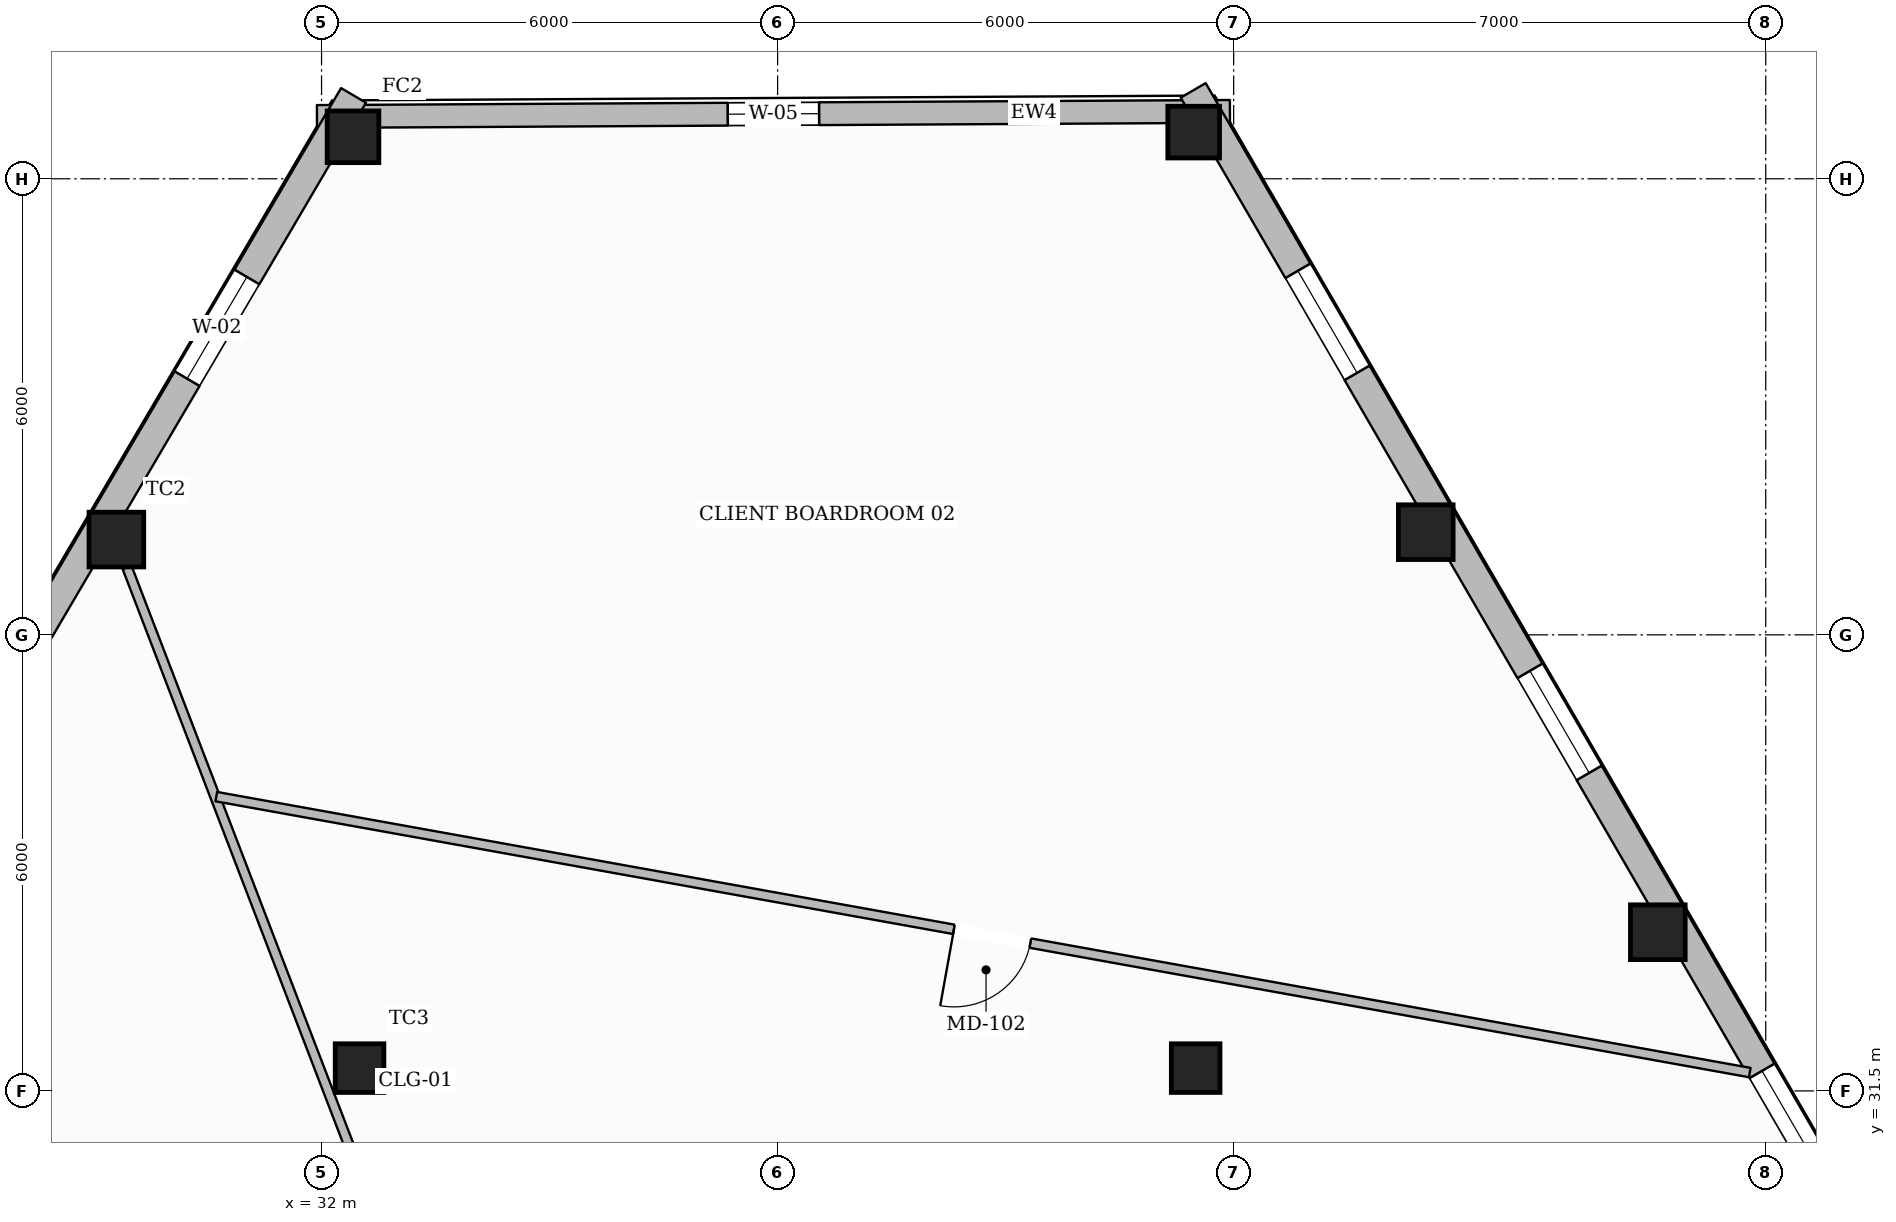
"""IFC4 building model, lengths in metres.
Left out: names, types, materials, properties, quantities, classifications, styles, units other than length and angle.
Written with IfcOpenShell. Run it as: python <this file> out.ifc"""

import sys

from ifc_helpers import new_model, si_unit, direction, frame, frame_2d, origin, origin_2d, place, context, subcontext, project, spatial, rectangle, hollow_rectangle, extrude, element, fill, save


model = new_model("IFC4")
c1 = context("Model", 3, precision=1e-05, world=origin(), true_north=direction((0.0, 1.0)))
c2 = subcontext(c1, "Body", "Model", "MODEL_VIEW")
j1 = project(units=[si_unit("LENGTHUNIT", "METRE"), si_unit("PLANEANGLEUNIT", "RADIAN")], contexts=[c1])
p1 = place(None, origin())
s1 = spatial("IfcSite", under=j1, at=p1, CompositionType="ELEMENT")
p2 = place(p1, origin())
s2 = spatial("IfcBuilding", under=s1, at=p2, CompositionType="ELEMENT")
p3 = place(p2, frame((0.0, 0.0, 139.4)))
s3 = spatial("IfcBuildingStorey", under=s2, at=p3, CompositionType="ELEMENT", Elevation=139.4)
p4 = place(p3, frame((32.414, 44.052, 0.0), z_axis=(0.0, 0.0, 1.0), x_axis=(1.0, 0.0, 0.0)))
e1 = element("IfcColumn", 1, at=p4, inside=s3, PredefinedType="COLUMN", context=c2, shape_type="SweptSolid", body=[
    extrude(hollow_rectangle(XDim=0.68, YDim=0.68, WallThickness=0.03, at=origin_2d()), origin(), (0.0, 0.0, 1.0), 3.6),
])
for number, where, z_axis, x_axis in (
    (2, (29.301, 38.753, 0.0), (0.0, 0.0, 1.0), (1.0, 0.0, 0.0)),
    (3, (49.58, 33.588, 0.0), (0.0, 0.0, 1.0), (1.0, 0.0, 0.0)),
    (4, (46.527, 38.851, 0.0), (0.0, 0.0, 1.0), (1.0, 0.0, 0.0)),
):
    element("IfcColumn", number, at=place(p3, frame(where, z_axis=z_axis, x_axis=x_axis)), inside=s3, PredefinedType="COLUMN", context=c2, shape_type="SweptSolid", body=[
        extrude(hollow_rectangle(XDim=0.72, YDim=0.72, WallThickness=0.032, at=origin_2d()), origin(), (0.0, 0.0, 1.0), 3.6),
    ])
p5 = place(p3, frame((43.474, 44.114, 0.0), z_axis=(0.0, 0.0, 1.0), x_axis=(1.0, 0.0, 0.0)))
e5 = element("IfcColumn", 5, at=p5, inside=s3, PredefinedType="COLUMN", context=c2, shape_type="SweptSolid", body=[
    extrude(hollow_rectangle(XDim=0.68, YDim=0.68, WallThickness=0.03, at=origin_2d()), origin(), (0.0, 0.0, 1.0), 3.6),
])
for number, where, z_axis, x_axis in (
    (6, (32.5, 31.8, 0.0), (0.0, 0.0, 1.0), (1.0, 0.0, 0.0)),
    (7, (43.5, 31.8, 0.0), (0.0, 0.0, 1.0), (1.0, 0.0, 0.0)),
):
    element("IfcColumn", number, at=place(p3, frame(where, z_axis=z_axis, x_axis=x_axis)), inside=s3, PredefinedType="COLUMN", context=c2, shape_type="SweptSolid", body=[
        extrude(hollow_rectangle(XDim=0.64, YDim=0.64, WallThickness=0.028, at=origin_2d()), origin(), (0.0, 0.0, 1.0), 3.6),
    ])
p6 = place(p3, frame((31.94, 44.32, 0.0), z_axis=(0.0, 0.0, 1.0), x_axis=(0.999984603996, 0.005549033414, 0.0)))
e8 = element("IfcWall", 8, at=p6, inside=s3, PredefinedType="STANDARD", context=c2, shape_type="SweptSolid", body=[
    extrude(rectangle(XDim=12.011, YDim=0.3, at=frame_2d((6.006, 0.0))), origin(), (0.0, 0.0, 1.0), 3.059),
])
p7 = place(p6, frame((5.406, 0.0, 0.65)))
e9 = element("IfcOpeningElement", 9, at=p7, cuts=e8, PredefinedType="OPENING", context=c2, shape_type="SweptSolid", body=[
    extrude(rectangle(XDim=1.2, YDim=1.7, at=frame_2d((0.6, 0.85))), frame((0.0, 0.16, 0.0), z_axis=(0.0, -1.0, 0.0), x_axis=(1.0, 0.0, 0.0)), (0.0, 0.0, 1.0), 0.32),
])
p8 = place(p3, frame((13.257, 11.982, 0.0), z_axis=(0.0, 0.0, 1.0), x_axis=(0.506593608381, 0.862184966204, 0.0)))
e10 = element("IfcWall", 10, at=p8, inside=s3, PredefinedType="STANDARD", context=c2, shape_type="SweptSolid", body=[
    extrude(rectangle(XDim=37.828, YDim=0.38, at=frame_2d((18.914, 0.0))), origin(), (0.0, 0.0, 1.0), 3.059),
])
p9 = place(p8, frame((33.507, 0.0, 0.65)))
e11 = element("IfcOpeningElement", 11, at=p9, cuts=e10, PredefinedType="OPENING", context=c2, shape_type="SweptSolid", body=[
    extrude(rectangle(XDim=1.55, YDim=1.75, at=frame_2d((0.775, 0.875))), frame((0.0, 0.2, 0.0), z_axis=(0.0, -1.0, 0.0), x_axis=(1.0, 0.0, 0.0)), (0.0, 0.0, 1.0), 0.4),
])
p10 = place(p8, frame((27.362, 0.0, 0.65)))
e12 = element("IfcOpeningElement", 12, at=p10, cuts=e10, PredefinedType="OPENING", context=c2, shape_type="SweptSolid", body=[
    extrude(rectangle(XDim=1.55, YDim=1.75, at=frame_2d((0.775, 0.875))), frame((0.0, 0.2, 0.0), z_axis=(0.0, -1.0, 0.0), x_axis=(1.0, 0.0, 0.0)), (0.0, 0.0, 1.0), 0.4),
])
p11 = place(p8, frame((15.07, 0.0, 0.65)))
e13 = element("IfcOpeningElement", 13, at=p11, cuts=e10, PredefinedType="OPENING", context=c2, shape_type="SweptSolid", body=[
    extrude(rectangle(XDim=1.55, YDim=1.75, at=frame_2d((0.775, 0.875))), frame((0.0, 0.2, 0.0), z_axis=(0.0, -1.0, 0.0), x_axis=(1.0, 0.0, 0.0)), (0.0, 0.0, 1.0), 0.4),
])
p12 = place(p8, frame((8.924, 0.0, 0.65)))
e14 = element("IfcOpeningElement", 14, at=p12, cuts=e10, PredefinedType="OPENING", context=c2, shape_type="SweptSolid", body=[
    extrude(rectangle(XDim=1.55, YDim=1.75, at=frame_2d((0.775, 0.875))), frame((0.0, 0.2, 0.0), z_axis=(0.0, -1.0, 0.0), x_axis=(1.0, 0.0, 0.0)), (0.0, 0.0, 1.0), 0.4),
])
p13 = place(p8, frame((2.778, 0.0, 0.65)))
e15 = element("IfcOpeningElement", 15, at=p13, cuts=e10, PredefinedType="OPENING", context=c2, shape_type="SweptSolid", body=[
    extrude(rectangle(XDim=1.55, YDim=1.75, at=frame_2d((0.775, 0.875))), frame((0.0, 0.2, 0.0), z_axis=(0.0, -1.0, 0.0), x_axis=(1.0, 0.0, 0.0)), (0.0, 0.0, 1.0), 0.4),
])
p14 = place(p3, frame((43.468, 44.663, 0.0), z_axis=(0.0, 0.0, 1.0), x_axis=(0.501788207044, -0.864990517446, 0.0)))
e16 = element("IfcWall", 16, at=p14, inside=s3, PredefinedType="STANDARD", context=c2, shape_type="SweptSolid", body=[
    extrude(rectangle(XDim=37.465, YDim=0.38, at=frame_2d((18.732, 0.0))), origin(), (0.0, 0.0, 1.0), 3.059),
])
p15 = place(p14, frame((33.167, 0.0, 0.65)))
e17 = element("IfcOpeningElement", 17, at=p15, cuts=e16, PredefinedType="OPENING", context=c2, shape_type="SweptSolid", body=[
    extrude(rectangle(XDim=1.55, YDim=1.75, at=frame_2d((0.775, 0.875))), frame((0.0, 0.2, 0.0), z_axis=(0.0, -1.0, 0.0), x_axis=(1.0, 0.0, 0.0)), (0.0, 0.0, 1.0), 0.4),
])
p16 = place(p14, frame((27.083, 0.0, 0.65)))
e18 = element("IfcOpeningElement", 18, at=p16, cuts=e16, PredefinedType="OPENING", context=c2, shape_type="SweptSolid", body=[
    extrude(rectangle(XDim=1.55, YDim=1.75, at=frame_2d((0.775, 0.875))), frame((0.0, 0.2, 0.0), z_axis=(0.0, -1.0, 0.0), x_axis=(1.0, 0.0, 0.0)), (0.0, 0.0, 1.0), 0.4),
])
p17 = place(p14, frame((14.914, 0.0, 0.65)))
e19 = element("IfcOpeningElement", 19, at=p17, cuts=e16, PredefinedType="OPENING", context=c2, shape_type="SweptSolid", body=[
    extrude(rectangle(XDim=1.55, YDim=1.75, at=frame_2d((0.775, 0.875))), frame((0.0, 0.2, 0.0), z_axis=(0.0, -1.0, 0.0), x_axis=(1.0, 0.0, 0.0)), (0.0, 0.0, 1.0), 0.4),
])
p18 = place(p14, frame((8.83, 0.0, 0.65)))
e20 = element("IfcOpeningElement", 20, at=p18, cuts=e16, PredefinedType="OPENING", context=c2, shape_type="SweptSolid", body=[
    extrude(rectangle(XDim=1.55, YDim=1.75, at=frame_2d((0.775, 0.875))), frame((0.0, 0.2, 0.0), z_axis=(0.0, -1.0, 0.0), x_axis=(1.0, 0.0, 0.0)), (0.0, 0.0, 1.0), 0.4),
])
p19 = place(p14, frame((2.745, 0.0, 0.65)))
e21 = element("IfcOpeningElement", 21, at=p19, cuts=e16, PredefinedType="OPENING", context=c2, shape_type="SweptSolid", body=[
    extrude(rectangle(XDim=1.55, YDim=1.75, at=frame_2d((0.775, 0.875))), frame((0.0, 0.2, 0.0), z_axis=(0.0, -1.0, 0.0), x_axis=(1.0, 0.0, 0.0)), (0.0, 0.0, 1.0), 0.4),
])
p20 = place(p3, frame((34.532, 25.131, 0.0), z_axis=(0.0, 0.0, 1.0), x_axis=(-0.358497395802, 0.933530726438, 0.0)))
e22 = element("IfcWall", 22, at=p20, inside=s3, PredefinedType="PARTITIONING", context=c2, shape_type="SweptSolid", body=[
    extrude(rectangle(XDim=14.198, YDim=0.125, at=frame_2d((7.099, 0.0))), origin(), (0.0, 0.0, 1.0), 3.141),
])
p21 = place(p3, frame((50.79, 31.741, 0.0), z_axis=(0.0, 0.0, 1.0), x_axis=(-0.984196030072, 0.177082394355, 0.0)))
e23 = element("IfcWall", 23, at=p21, inside=s3, PredefinedType="PARTITIONING", context=c2, shape_type="SweptSolid", body=[
    extrude(rectangle(XDim=20.498, YDim=0.125, at=frame_2d((10.249, 0.0))), origin(), (0.0, 0.0, 1.0), 3.288),
])
p22 = place(p21, frame((9.618, 0.0, 0.0)))
e24 = element("IfcOpeningElement", 24, at=p22, cuts=e23, PredefinedType="OPENING", context=c2, shape_type="SweptSolid", body=[
    extrude(rectangle(XDim=1.02, YDim=2.15, at=frame_2d((0.51, 1.075))), frame((0.0, 0.073, 0.0), z_axis=(0.0, -1.0, 0.0), x_axis=(1.0, 0.0, 0.0)), (0.0, 0.0, 1.0), 0.145),
])
p23 = place(p9, origin())
e25 = element("IfcWindow", 25, at=p23, inside=s3, PartitioningType="SINGLE_PANEL", PredefinedType="WINDOW", context=c2, shape_type="SweptSolid", body=[
    extrude(rectangle(XDim=1.55, YDim=1.75, at=frame_2d((0.775, 0.875))), frame((0.0, 0.03, 0.0), z_axis=(0.0, -1.0, 0.0), x_axis=(1.0, 0.0, 0.0)), (0.0, 0.0, 1.0), 0.06),
])
fill(e11, e25)
p24 = place(p17, origin())
e26 = element("IfcWindow", 26, at=p24, inside=s3, PartitioningType="SINGLE_PANEL", PredefinedType="WINDOW", context=c2, shape_type="SweptSolid", body=[
    extrude(rectangle(XDim=1.55, YDim=1.75, at=frame_2d((0.775, 0.875))), frame((0.0, 0.03, 0.0), z_axis=(0.0, -1.0, 0.0), x_axis=(1.0, 0.0, 0.0)), (0.0, 0.0, 1.0), 0.06),
])
fill(e19, e26)
p25 = place(p18, origin())
e27 = element("IfcWindow", 27, at=p25, inside=s3, PartitioningType="SINGLE_PANEL", PredefinedType="WINDOW", context=c2, shape_type="SweptSolid", body=[
    extrude(rectangle(XDim=1.55, YDim=1.75, at=frame_2d((0.775, 0.875))), frame((0.0, 0.03, 0.0), z_axis=(0.0, -1.0, 0.0), x_axis=(1.0, 0.0, 0.0)), (0.0, 0.0, 1.0), 0.06),
])
fill(e20, e27)
p26 = place(p19, origin())
e28 = element("IfcWindow", 28, at=p26, inside=s3, PartitioningType="SINGLE_PANEL", PredefinedType="WINDOW", context=c2, shape_type="SweptSolid", body=[
    extrude(rectangle(XDim=1.55, YDim=1.75, at=frame_2d((0.775, 0.875))), frame((0.0, 0.03, 0.0), z_axis=(0.0, -1.0, 0.0), x_axis=(1.0, 0.0, 0.0)), (0.0, 0.0, 1.0), 0.06),
])
fill(e21, e28)
p27 = place(p7, origin())
e29 = element("IfcWindow", 29, at=p27, inside=s3, PartitioningType="SINGLE_PANEL", PredefinedType="WINDOW", context=c2, shape_type="SweptSolid", body=[
    extrude(rectangle(XDim=1.2, YDim=1.7, at=frame_2d((0.6, 0.85))), frame((0.0, 0.03, 0.0), z_axis=(0.0, -1.0, 0.0), x_axis=(1.0, 0.0, 0.0)), (0.0, 0.0, 1.0), 0.06),
])
fill(e9, e29)
p28 = place(p22, origin())
e30 = element("IfcDoor", 30, at=p28, inside=s3, OperationType="SINGLE_SWING_RIGHT", PredefinedType="DOOR", context=c2, shape_type="SweptSolid", body=[
    extrude(rectangle(XDim=1.02, YDim=2.15, at=frame_2d((0.51, 1.075))), frame((0.0, 0.025, 0.0), z_axis=(0.0, -1.0, 0.0), x_axis=(1.0, 0.0, 0.0)), (0.0, 0.0, 1.0), 0.05),
])
fill(e24, e30)
save(model, sys.argv[1])
